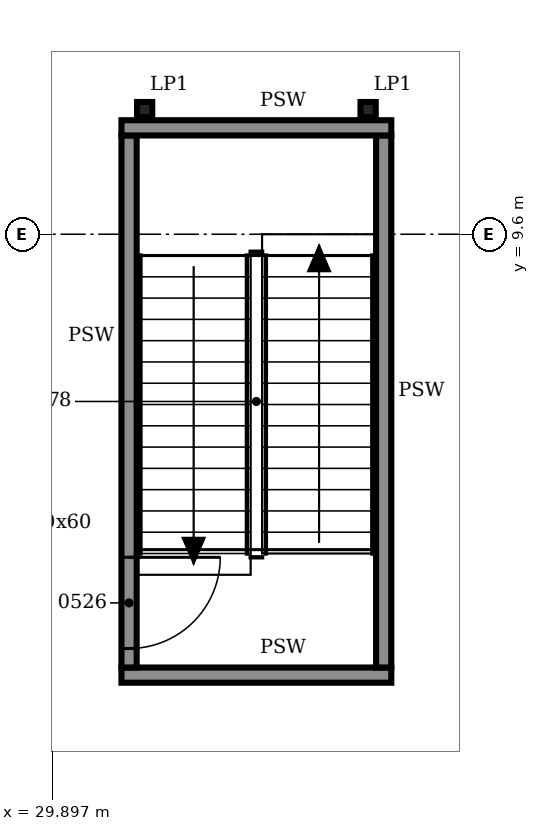
"""IFC4 building model, lengths in metres.
Left out: names, types, materials, properties, quantities, classifications, styles, units other than length and angle.
Written with IfcOpenShell. Run it as: python <this file> out.ifc"""

import sys

from ifc_helpers import new_model, si_unit, direction, frame, frame_2d, origin, origin_2d, place, context, subcontext, project, spatial, rectangle, i_section, extrude, element, fill, save


model = new_model("IFC4")
c1 = context("Model", 3, precision=1e-05, world=origin(), true_north=direction((0.0, 1.0)))
c2 = subcontext(c1, "Body", "Model", "MODEL_VIEW")
j1 = project(units=[si_unit("LENGTHUNIT", "METRE"), si_unit("PLANEANGLEUNIT", "RADIAN")], contexts=[c1])
p1 = place(None, origin())
s1 = spatial("IfcSite", under=j1, at=p1, CompositionType="ELEMENT")
p2 = place(p1, origin())
s2 = spatial("IfcBuilding", under=s1, at=p2, CompositionType="ELEMENT")
p3 = place(p2, frame((0.0, 0.0, 30.6)))
s3 = spatial("IfcBuildingStorey", under=s2, at=p3, CompositionType="ELEMENT", Elevation=30.6)
for number, where, z_axis, x_axis in (
    (1, (31.105, 11.24, 0.0), (0.0, 0.0, 1.0), (1.0, 0.0, 0.0)),
    (2, (34.045, 11.24, 0.0), (0.0, 0.0, 1.0), (1.0, 0.0, 0.0)),
):
    element("IfcColumn", number, at=place(p3, frame(where, z_axis=z_axis, x_axis=x_axis)), inside=s3, PredefinedType="COLUMN", context=c2, shape_type="SweptSolid", body=[
        extrude(i_section(OverallWidth=0.2, OverallDepth=0.2, WebThickness=0.009, FlangeThickness=0.015, FilletRadius=0.018, at=origin_2d()), origin(), (0.0, 0.0, 1.0), 4.8),
    ])
p4 = place(p3, frame((30.8, 3.8, 0.0), z_axis=(0.0, 0.0, 1.0), x_axis=(1.0, 0.0, 0.0)))
e3 = element("IfcWall", 3, at=p4, inside=s3, PredefinedType="SOLIDWALL", context=c2, shape_type="SweptSolid", body=[
    extrude(rectangle(XDim=3.55, YDim=0.2, at=frame_2d((1.775, 0.0))), origin(), (0.0, 0.0, 1.0), 4.6),
])
p5 = place(p3, frame((30.9, 3.9, 0.0), z_axis=(0.0, 0.0, 1.0), x_axis=(0.0, 1.0, 0.0)))
e4 = element("IfcWall", 4, at=p5, inside=s3, PredefinedType="SOLIDWALL", context=c2, shape_type="SweptSolid", body=[
    extrude(rectangle(XDim=7.0, YDim=0.2, at=frame_2d((3.5, 0.0))), origin(), (0.0, 0.0, 1.0), 4.6),
])
p6 = place(p5, frame((0.25, 0.0, 0.0)))
e5 = element("IfcOpeningElement", 5, at=p6, cuts=e4, PredefinedType="OPENING", context=c2, shape_type="SweptSolid", body=[
    extrude(rectangle(XDim=1.2, YDim=2.1, at=frame_2d((0.6, 1.05))), frame((0.0, 0.11, 0.0), z_axis=(0.0, -1.0, 0.0), x_axis=(1.0, 0.0, 0.0)), (0.0, 0.0, 1.0), 0.22),
])
p7 = place(p3, frame((34.25, 3.9, 0.0), z_axis=(0.0, 0.0, 1.0), x_axis=(0.0, 1.0, 0.0)))
e6 = element("IfcWall", 6, at=p7, inside=s3, PredefinedType="SOLIDWALL", context=c2, shape_type="SweptSolid", body=[
    extrude(rectangle(XDim=7.0, YDim=0.2, at=frame_2d((3.5, 0.0))), origin(), (0.0, 0.0, 1.0), 4.6),
])
p8 = place(p3, frame((30.8, 11.0, 0.0), z_axis=(0.0, 0.0, 1.0), x_axis=(1.0, 0.0, 0.0)))
e7 = element("IfcWall", 7, at=p8, inside=s3, PredefinedType="SOLIDWALL", context=c2, shape_type="SweptSolid", body=[
    extrude(rectangle(XDim=3.55, YDim=0.2, at=frame_2d((1.775, 0.0))), origin(), (0.0, 0.0, 1.0), 4.6),
])
p9 = place(p6, frame((1.2, 0.0, 0.0), z_axis=(0.0, 0.0, 1.0), x_axis=(-1.0, 0.0, 0.0)))
e8 = element("IfcDoor", 8, at=p9, inside=s3, OperationType="SINGLE_SWING_LEFT", PredefinedType="DOOR", context=c2, shape_type="SweptSolid", body=[
    extrude(rectangle(XDim=1.2, YDim=2.1, at=frame_2d((0.6, 1.05))), frame((0.0, 0.025, 0.0), z_axis=(0.0, -1.0, 0.0), x_axis=(1.0, 0.0, 0.0)), (0.0, 0.0, 1.0), 0.05),
])
fill(e5, e8)
save(model, sys.argv[1])
